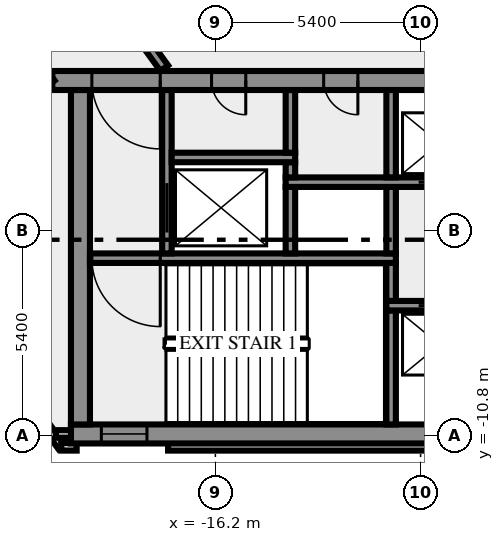
"""IFC4 building model, lengths in metres.
Left out: names, types, materials, properties, quantities, classifications, styles, units other than length and angle.
Written with IfcOpenShell. Run it as: python <this file> out.ifc"""

import sys

from ifc_helpers import new_model, si_unit, direction, frame, frame_2d, origin, place, context, subcontext, project, spatial, rectangle, extrude, element, fill, save


model = new_model("IFC4")
c1 = context("Model", 3, precision=1e-05, world=origin(), true_north=direction((0.0, 1.0)))
c2 = subcontext(c1, "Body", "Model", "MODEL_VIEW")
j1 = project(units=[si_unit("LENGTHUNIT", "METRE"), si_unit("PLANEANGLEUNIT", "RADIAN")], contexts=[c1])
p1 = place(None, origin())
s1 = spatial("IfcSite", under=j1, at=p1, CompositionType="ELEMENT")
p2 = place(p1, origin())
s2 = spatial("IfcBuilding", under=s1, at=p2, CompositionType="ELEMENT")
p3 = place(p2, frame((0.0, 0.0, 75.0)))
s3 = spatial("IfcBuildingStorey", under=s2, at=p3, CompositionType="ELEMENT", Elevation=75.0)
p4 = place(p3, frame((-21.833, -8.909, 0.0), z_axis=(0.0, 0.0, 1.0), x_axis=(0.587766567315, -0.809030569476, 0.0)))
e1 = element("IfcWall", 1, at=p4, inside=s3, PredefinedType="SOLIDWALL", context=c2, shape_type="SweptSolid", body=[
    extrude(rectangle(XDim=2.688, YDim=0.2, at=frame_2d((1.344, 0.0))), origin(), (0.0, 0.0, 1.0), 3.4),
])
p5 = place(p3, frame((-20.256, -11.088, 0.0), z_axis=(0.0, 0.0, 1.0), x_axis=(1.0, 0.0, 0.0)))
e2 = element("IfcWall", 2, at=p5, inside=s3, PredefinedType="SOLIDWALL", context=c2, shape_type="SweptSolid", body=[
    extrude(rectangle(XDim=0.406, YDim=0.2, at=frame_2d((0.203, 0.0))), origin(), (0.0, 0.0, 1.0), 3.4),
])
p6 = place(p3, frame((-17.444, -11.088, 0.0), z_axis=(0.0, 0.0, 1.0), x_axis=(1.0, 0.0, 0.0)))
e3 = element("IfcWall", 3, at=p6, inside=s3, PredefinedType="SOLIDWALL", context=c2, shape_type="SweptSolid", body=[
    extrude(rectangle(XDim=34.888, YDim=0.2, at=frame_2d((17.444, 0.0))), origin(), (0.0, 0.0, 1.0), 3.4),
])
p7 = place(p3, frame((-19.98, -10.75, 0.0), z_axis=(0.0, 0.0, 1.0), x_axis=(-1.0, 0.0, 0.0)))
e4 = element("IfcWall", 4, at=p7, inside=s3, PredefinedType="SOLIDWALL", context=c2, shape_type="SweptSolid", body=[
    extrude(rectangle(XDim=0.417, YDim=0.2, at=frame_2d((0.208, 0.0))), origin(), (0.0, 0.0, 1.0), 3.4),
])
p8 = place(p3, frame((-20.0, -10.75, 0.0), z_axis=(0.0, 0.0, 1.0), x_axis=(1.0, 0.0, 0.0)))
e5 = element("IfcWall", 5, at=p8, inside=s3, PredefinedType="SHEAR", context=c2, shape_type="SweptSolid", body=[
    extrude(rectangle(XDim=40.0, YDim=0.5, at=frame_2d((20.0, 0.0))), origin(), (0.0, 0.0, 1.0), 3.4),
])
p9 = place(p8, frame((0.8, 0.0, 1.0)))
e6 = element("IfcOpeningElement", 6, at=p9, cuts=e5, PredefinedType="OPENING", context=c2, shape_type="SweptSolid", body=[
    extrude(rectangle(XDim=1.2, YDim=1.2, at=frame_2d((0.6, 0.6))), frame((0.0, 0.26, 0.0), z_axis=(0.0, -1.0, 0.0), x_axis=(1.0, 0.0, 0.0)), (0.0, 0.0, 1.0), 0.52),
])
p10 = place(p8, frame((38.0, 0.0, 1.0)))
e7 = element("IfcOpeningElement", 7, at=p10, cuts=e5, PredefinedType="OPENING", context=c2, shape_type="SweptSolid", body=[
    extrude(rectangle(XDim=1.2, YDim=1.2, at=frame_2d((0.6, 0.6))), frame((0.0, 0.26, 0.0), z_axis=(0.0, -1.0, 0.0), x_axis=(1.0, 0.0, 0.0)), (0.0, 0.0, 1.0), 0.52),
])
p11 = place(p3, frame((-19.75, -10.5, 0.0), z_axis=(0.0, 0.0, 1.0), x_axis=(0.0, 1.0, 0.0)))
e8 = element("IfcWall", 8, at=p11, inside=s3, PredefinedType="SHEAR", context=c2, shape_type="SweptSolid", body=[
    extrude(rectangle(XDim=8.8, YDim=0.5, at=frame_2d((4.4, 0.0))), origin(), (0.0, 0.0, 1.0), 3.4),
])
p12 = place(p3, frame((-11.575, -10.5, 0.0), z_axis=(0.0, 0.0, 1.0), x_axis=(0.0, 1.0, 0.0)))
e9 = element("IfcWall", 9, at=p12, inside=s3, PredefinedType="SHEAR", context=c2, shape_type="SweptSolid", body=[
    extrude(rectangle(XDim=3.0, YDim=0.25, at=frame_2d((1.5, 0.0))), origin(), (0.0, 0.0, 1.0), 3.4),
])
p13 = place(p3, frame((11.7, -7.375, 0.0), z_axis=(0.0, 0.0, 1.0), x_axis=(-1.0, 0.0, 0.0)))
e10 = element("IfcWall", 10, at=p13, inside=s3, PredefinedType="SHEAR", context=c2, shape_type="SweptSolid", body=[
    extrude(rectangle(XDim=23.4, YDim=0.25, at=frame_2d((11.7, 0.0))), origin(), (0.0, 0.0, 1.0), 3.4),
])
p14 = place(p13, frame((21.45, 0.0, 0.0)))
e11 = element("IfcOpeningElement", 11, at=p14, cuts=e10, PredefinedType="OPENING", context=c2, shape_type="SweptSolid", body=[
    extrude(rectangle(XDim=1.1, YDim=2.1, at=frame_2d((0.55, 1.05))), frame((0.0, 0.135, 0.0), z_axis=(0.0, -1.0, 0.0), x_axis=(1.0, 0.0, 0.0)), (0.0, 0.0, 1.0), 0.27),
])
p15 = place(p13, frame((18.95, 0.0, 0.0)))
e12 = element("IfcOpeningElement", 12, at=p15, cuts=e10, PredefinedType="OPENING", context=c2, shape_type="SweptSolid", body=[
    extrude(rectangle(XDim=1.1, YDim=2.1, at=frame_2d((0.55, 1.05))), frame((0.0, 0.135, 0.0), z_axis=(0.0, -1.0, 0.0), x_axis=(1.0, 0.0, 0.0)), (0.0, 0.0, 1.0), 0.27),
])
p16 = place(p13, frame((16.45, 0.0, 0.0)))
e13 = element("IfcOpeningElement", 13, at=p16, cuts=e10, PredefinedType="OPENING", context=c2, shape_type="SweptSolid", body=[
    extrude(rectangle(XDim=1.1, YDim=2.1, at=frame_2d((0.55, 1.05))), frame((0.0, 0.135, 0.0), z_axis=(0.0, -1.0, 0.0), x_axis=(1.0, 0.0, 0.0)), (0.0, 0.0, 1.0), 0.27),
])
p17 = place(p13, frame((14.65, 0.0, 0.0)))
e14 = element("IfcOpeningElement", 14, at=p17, cuts=e10, PredefinedType="OPENING", context=c2, shape_type="SweptSolid", body=[
    extrude(rectangle(XDim=0.8, YDim=2.1, at=frame_2d((0.4, 1.05))), frame((0.0, 0.135, 0.0), z_axis=(0.0, -1.0, 0.0), x_axis=(1.0, 0.0, 0.0)), (0.0, 0.0, 1.0), 0.27),
])
p18 = place(p13, frame((12.8, 0.0, 0.0)))
e15 = element("IfcOpeningElement", 15, at=p18, cuts=e10, PredefinedType="OPENING", context=c2, shape_type="SweptSolid", body=[
    extrude(rectangle(XDim=0.9, YDim=2.1, at=frame_2d((0.45, 1.05))), frame((0.0, 0.135, 0.0), z_axis=(0.0, -1.0, 0.0), x_axis=(1.0, 0.0, 0.0)), (0.0, 0.0, 1.0), 0.27),
])
p19 = place(p13, frame((10.7, 0.0, 0.0)))
e16 = element("IfcOpeningElement", 16, at=p19, cuts=e10, PredefinedType="OPENING", context=c2, shape_type="SweptSolid", body=[
    extrude(rectangle(XDim=0.9, YDim=2.1, at=frame_2d((0.45, 1.05))), frame((0.0, 0.135, 0.0), z_axis=(0.0, -1.0, 0.0), x_axis=(1.0, 0.0, 0.0)), (0.0, 0.0, 1.0), 0.27),
])
p20 = place(p3, frame((-11.575, -7.25, 0.0), z_axis=(0.0, 0.0, 1.0), x_axis=(0.0, 1.0, 0.0)))
e17 = element("IfcWall", 17, at=p20, inside=s3, PredefinedType="SHEAR", context=c2, shape_type="SweptSolid", body=[
    extrude(rectangle(XDim=1.0, YDim=0.25, at=frame_2d((0.5, 0.0))), origin(), (0.0, 0.0, 1.0), 3.4),
])
p21 = place(p3, frame((-11.45, -6.125, 0.0), z_axis=(0.0, 0.0, 1.0), x_axis=(-1.0, 0.0, 0.0)))
e18 = element("IfcWall", 18, at=p21, inside=s3, PredefinedType="SHEAR", context=c2, shape_type="SweptSolid", body=[
    extrude(rectangle(XDim=8.05, YDim=0.25, at=frame_2d((4.025, 0.0))), origin(), (0.0, 0.0, 1.0), 3.4),
])
p22 = place(p21, frame((6.2, 0.0, 0.0)))
e19 = element("IfcOpeningElement", 19, at=p22, cuts=e18, PredefinedType="OPENING", context=c2, shape_type="SweptSolid", body=[
    extrude(rectangle(XDim=1.8, YDim=2.1, at=frame_2d((0.9, 1.05))), frame((0.0, 0.135, 0.0), z_axis=(0.0, -1.0, 0.0), x_axis=(1.0, 0.0, 0.0)), (0.0, 0.0, 1.0), 0.27),
])
p23 = place(p3, frame((-17.475, -6.0, 0.0), z_axis=(0.0, 0.0, 1.0), x_axis=(0.0, 1.0, 0.0)))
e20 = element("IfcWall", 20, at=p23, inside=s3, PredefinedType="SHEAR", context=c2, shape_type="SweptSolid", body=[
    extrude(rectangle(XDim=4.3, YDim=0.25, at=frame_2d((2.15, 0.0))), origin(), (0.0, 0.0, 1.0), 3.4),
])
p24 = place(p23, frame((0.55, 0.0, 0.0)))
e21 = element("IfcOpeningElement", 21, at=p24, cuts=e20, PredefinedType="OPENING", context=c2, shape_type="SweptSolid", body=[
    extrude(rectangle(XDim=1.3, YDim=2.1, at=frame_2d((0.65, 1.05))), frame((0.0, 0.135, 0.0), z_axis=(0.0, -1.0, 0.0), x_axis=(1.0, 0.0, 0.0)), (0.0, 0.0, 1.0), 0.27),
])
for number, where, z_axis, x_axis in (
    (22, (-14.225, -6.0, 0.0), (0.0, 0.0, 1.0), (0.0, 1.0, 0.0)),
    (23, (-11.575, -6.0, 0.0), (0.0, 0.0, 1.0), (0.0, 1.0, 0.0)),
):
    element("IfcWall", number, at=place(p3, frame(where, z_axis=z_axis, x_axis=x_axis)), inside=s3, PredefinedType="SHEAR", context=c2, shape_type="SweptSolid", body=[
        extrude(rectangle(XDim=1.75, YDim=0.25, at=frame_2d((0.875, 0.0))), origin(), (0.0, 0.0, 1.0), 3.4),
    ])
p25 = place(p3, frame((-14.35, -4.125, 0.0), z_axis=(0.0, 0.0, 1.0), x_axis=(1.0, 0.0, 0.0)))
e24 = element("IfcWall", 24, at=p25, inside=s3, PredefinedType="SHEAR", context=c2, shape_type="SweptSolid", body=[
    extrude(rectangle(XDim=10.4, YDim=0.25, at=frame_2d((5.2, 0.0))), origin(), (0.0, 0.0, 1.0), 3.4),
])
p26 = place(p25, frame((3.5, 0.0, 0.0)))
e25 = element("IfcOpeningElement", 25, at=p26, cuts=e24, PredefinedType="OPENING", context=c2, shape_type="SweptSolid", body=[
    extrude(rectangle(XDim=1.1, YDim=2.1, at=frame_2d((0.55, 1.05))), frame((0.0, 0.135, 0.0), z_axis=(0.0, -1.0, 0.0), x_axis=(1.0, 0.0, 0.0)), (0.0, 0.0, 1.0), 0.27),
])
p27 = place(p25, frame((6.0, 0.0, 0.0)))
e26 = element("IfcOpeningElement", 26, at=p27, cuts=e24, PredefinedType="OPENING", context=c2, shape_type="SweptSolid", body=[
    extrude(rectangle(XDim=1.1, YDim=2.1, at=frame_2d((0.55, 1.05))), frame((0.0, 0.135, 0.0), z_axis=(0.0, -1.0, 0.0), x_axis=(1.0, 0.0, 0.0)), (0.0, 0.0, 1.0), 0.27),
])
p28 = place(p25, frame((8.5, 0.0, 0.0)))
e27 = element("IfcOpeningElement", 27, at=p28, cuts=e24, PredefinedType="OPENING", context=c2, shape_type="SweptSolid", body=[
    extrude(rectangle(XDim=1.1, YDim=2.1, at=frame_2d((0.55, 1.05))), frame((0.0, 0.135, 0.0), z_axis=(0.0, -1.0, 0.0), x_axis=(1.0, 0.0, 0.0)), (0.0, 0.0, 1.0), 0.27),
])
p29 = place(p3, frame((-14.225, -4.0, 0.0), z_axis=(0.0, 0.0, 1.0), x_axis=(0.0, 1.0, 0.0)))
e28 = element("IfcWall", 28, at=p29, inside=s3, PredefinedType="SHEAR", context=c2, shape_type="SweptSolid", body=[
    extrude(rectangle(XDim=0.4, YDim=0.25, at=frame_2d((0.2, 0.0))), origin(), (0.0, 0.0, 1.0), 3.4),
])
p30 = place(p3, frame((-11.575, -4.0, 0.0), z_axis=(0.0, 0.0, 1.0), x_axis=(0.0, 1.0, 0.0)))
e29 = element("IfcWall", 29, at=p30, inside=s3, PredefinedType="SHEAR", context=c2, shape_type="SweptSolid", body=[
    extrude(rectangle(XDim=2.3, YDim=0.25, at=frame_2d((1.15, 0.0))), origin(), (0.0, 0.0, 1.0), 3.4),
])
p31 = place(p3, frame((-17.35, -3.475, 0.0), z_axis=(0.0, 0.0, 1.0), x_axis=(1.0, 0.0, 0.0)))
e30 = element("IfcWall", 30, at=p31, inside=s3, PredefinedType="SHEAR", context=c2, shape_type="SweptSolid", body=[
    extrude(rectangle(XDim=3.25, YDim=0.25, at=frame_2d((1.625, 0.0))), origin(), (0.0, 0.0, 1.0), 3.4),
])
p32 = place(p3, frame((-14.225, -3.35, 0.0), z_axis=(0.0, 0.0, 1.0), x_axis=(0.0, 1.0, 0.0)))
e31 = element("IfcWall", 31, at=p32, inside=s3, PredefinedType="SHEAR", context=c2, shape_type="SweptSolid", body=[
    extrude(rectangle(XDim=1.65, YDim=0.25, at=frame_2d((0.825, 0.0))), origin(), (0.0, 0.0, 1.0), 3.4),
])
p33 = place(p3, frame((20.49, -1.45, 0.0), z_axis=(0.0, 0.0, 1.0), x_axis=(-1.0, 0.0, 0.0)))
e32 = element("IfcWall", 32, at=p33, inside=s3, PredefinedType="SHEAR", context=c2, shape_type="SweptSolid", body=[
    extrude(rectangle(XDim=40.98, YDim=0.5, at=frame_2d((20.49, 0.0))), origin(), (0.0, 0.0, 1.0), 3.4),
])
p34 = place(p33, frame((38.14, 0.0, 0.0)))
e33 = element("IfcOpeningElement", 33, at=p34, cuts=e32, PredefinedType="OPENING", context=c2, shape_type="SweptSolid", body=[
    extrude(rectangle(XDim=1.8, YDim=2.1, at=frame_2d((0.9, 1.05))), frame((0.0, 0.26, 0.0), z_axis=(0.0, -1.0, 0.0), x_axis=(1.0, 0.0, 0.0)), (0.0, 0.0, 1.0), 0.52),
])
p35 = place(p33, frame((35.89, 0.0, 0.0)))
e34 = element("IfcOpeningElement", 34, at=p35, cuts=e32, PredefinedType="OPENING", context=c2, shape_type="SweptSolid", body=[
    extrude(rectangle(XDim=0.9, YDim=2.1, at=frame_2d((0.45, 1.05))), frame((0.0, 0.26, 0.0), z_axis=(0.0, -1.0, 0.0), x_axis=(1.0, 0.0, 0.0)), (0.0, 0.0, 1.0), 0.52),
])
p36 = place(p33, frame((32.94, 0.0, 0.0)))
e35 = element("IfcOpeningElement", 35, at=p36, cuts=e32, PredefinedType="OPENING", context=c2, shape_type="SweptSolid", body=[
    extrude(rectangle(XDim=0.9, YDim=2.1, at=frame_2d((0.45, 1.05))), frame((0.0, 0.26, 0.0), z_axis=(0.0, -1.0, 0.0), x_axis=(1.0, 0.0, 0.0)), (0.0, 0.0, 1.0), 0.52),
])
p37 = place(p33, frame((21.765, 0.0, 0.0)))
e36 = element("IfcOpeningElement", 36, at=p37, cuts=e32, PredefinedType="OPENING", context=c2, shape_type="SweptSolid", body=[
    extrude(rectangle(XDim=2.0, YDim=2.1, at=frame_2d((1.0, 1.05))), frame((0.0, 0.26, 0.0), z_axis=(0.0, -1.0, 0.0), x_axis=(1.0, 0.0, 0.0)), (0.0, 0.0, 1.0), 0.52),
])
p38 = place(p33, frame((7.14, 0.0, 0.0)))
e37 = element("IfcOpeningElement", 37, at=p38, cuts=e32, PredefinedType="OPENING", context=c2, shape_type="SweptSolid", body=[
    extrude(rectangle(XDim=0.9, YDim=2.1, at=frame_2d((0.45, 1.05))), frame((0.0, 0.26, 0.0), z_axis=(0.0, -1.0, 0.0), x_axis=(1.0, 0.0, 0.0)), (0.0, 0.0, 1.0), 0.52),
])
p39 = place(p33, frame((5.028, 0.0, 0.0)))
e38 = element("IfcOpeningElement", 38, at=p39, cuts=e32, PredefinedType="OPENING", context=c2, shape_type="SweptSolid", body=[
    extrude(rectangle(XDim=0.8, YDim=2.1, at=frame_2d((0.4, 1.05))), frame((0.0, 0.26, 0.0), z_axis=(0.0, -1.0, 0.0), x_axis=(1.0, 0.0, 0.0)), (0.0, 0.0, 1.0), 0.52),
])
p40 = place(p33, frame((3.452, 0.0, 0.0)))
e39 = element("IfcOpeningElement", 39, at=p40, cuts=e32, PredefinedType="OPENING", context=c2, shape_type="SweptSolid", body=[
    extrude(rectangle(XDim=0.8, YDim=2.1, at=frame_2d((0.4, 1.05))), frame((0.0, 0.26, 0.0), z_axis=(0.0, -1.0, 0.0), x_axis=(1.0, 0.0, 0.0)), (0.0, 0.0, 1.0), 0.52),
])
p41 = place(p33, frame((1.04, 0.0, 0.0)))
e40 = element("IfcOpeningElement", 40, at=p41, cuts=e32, PredefinedType="OPENING", context=c2, shape_type="SweptSolid", body=[
    extrude(rectangle(XDim=1.8, YDim=2.1, at=frame_2d((0.9, 1.05))), frame((0.0, 0.26, 0.0), z_axis=(0.0, -1.0, 0.0), x_axis=(1.0, 0.0, 0.0)), (0.0, 0.0, 1.0), 0.52),
])
p42 = place(p3, frame((-20.531, -1.523, 0.0), z_axis=(0.0, 0.0, 1.0), x_axis=(-0.587784593204, 0.809017473231, 0.0)))
e41 = element("IfcWall", 41, at=p42, inside=s3, PredefinedType="SOLIDWALL", context=c2, shape_type="SweptSolid", body=[
    extrude(rectangle(XDim=44.67, YDim=0.25, at=frame_2d((22.335, 0.0))), origin(), (0.0, 0.0, 1.0), 3.4),
])
p43 = place(p42, frame((0.533, 0.0, 0.0)))
e42 = element("IfcOpeningElement", 42, at=p43, cuts=e41, PredefinedType="OPENING", context=c2, shape_type="SweptSolid", body=[
    extrude(rectangle(XDim=0.9, YDim=2.1, at=frame_2d((0.45, 1.05))), frame((0.0, 0.135, 0.0), z_axis=(0.0, -1.0, 0.0), x_axis=(1.0, 0.0, 0.0)), (0.0, 0.0, 1.0), 0.27),
])
p44 = place(p42, frame((32.531, 0.0, 0.0)))
e43 = element("IfcOpeningElement", 43, at=p44, cuts=e41, PredefinedType="OPENING", context=c2, shape_type="SweptSolid", body=[
    extrude(rectangle(XDim=1.8, YDim=2.1, at=frame_2d((0.9, 1.05))), frame((0.0, 0.135, 0.0), z_axis=(0.0, -1.0, 0.0), x_axis=(1.0, 0.0, 0.0)), (0.0, 0.0, 1.0), 0.27),
])
p45 = place(p42, frame((14.566, 0.0, 0.0)))
e44 = element("IfcOpeningElement", 44, at=p45, cuts=e41, PredefinedType="OPENING", context=c2, shape_type="SweptSolid", body=[
    extrude(rectangle(XDim=0.9, YDim=2.1, at=frame_2d((0.45, 1.05))), frame((0.0, 0.135, 0.0), z_axis=(0.0, -1.0, 0.0), x_axis=(1.0, 0.0, 0.0)), (0.0, 0.0, 1.0), 0.27),
])
p46 = place(p3, frame((-37.232, 25.972, 0.0), z_axis=(0.0, 0.0, 1.0), x_axis=(0.587786323093, -0.809016216391, 0.0)))
e45 = element("IfcWall", 45, at=p46, inside=s3, PredefinedType="SOLIDWALL", context=c2, shape_type="SweptSolid", body=[
    extrude(rectangle(XDim=33.493, YDim=0.25, at=frame_2d((16.747, 0.0))), origin(), (0.0, 0.0, 1.0), 3.4),
])
p47 = place(p46, frame((16.435, 0.0, 0.0)))
e46 = element("IfcOpeningElement", 46, at=p47, cuts=e45, PredefinedType="OPENING", context=c2, shape_type="SweptSolid", body=[
    extrude(rectangle(XDim=0.9, YDim=2.1, at=frame_2d((0.45, 1.05))), frame((0.0, 0.135, 0.0), z_axis=(0.0, -1.0, 0.0), x_axis=(1.0, 0.0, 0.0)), (0.0, 0.0, 1.0), 0.27),
])
p48 = place(p46, frame((7.137, 0.0, 0.0)))
e47 = element("IfcOpeningElement", 47, at=p48, cuts=e45, PredefinedType="OPENING", context=c2, shape_type="SweptSolid", body=[
    extrude(rectangle(XDim=1.8, YDim=2.1, at=frame_2d((0.9, 1.05))), frame((0.0, 0.135, 0.0), z_axis=(0.0, -1.0, 0.0), x_axis=(1.0, 0.0, 0.0)), (0.0, 0.0, 1.0), 0.27),
])
p49 = place(p9, origin())
e48 = element("IfcWindow", 48, at=p49, inside=s3, PartitioningType="SINGLE_PANEL", PredefinedType="WINDOW", context=c2, shape_type="SweptSolid", body=[
    extrude(rectangle(XDim=1.2, YDim=1.2, at=frame_2d((0.6, 0.6))), frame((0.0, 0.03, 0.0), z_axis=(0.0, -1.0, 0.0), x_axis=(1.0, 0.0, 0.0)), (0.0, 0.0, 1.0), 0.06),
])
fill(e6, e48)
p50 = place(p14, origin())
e49 = element("IfcDoor", 49, at=p50, inside=s3, OperationType="DOUBLE_DOOR_SLIDING", PredefinedType="DOOR", context=c2, shape_type="SweptSolid", body=[
    extrude(rectangle(XDim=1.1, YDim=2.1, at=frame_2d((0.55, 1.05))), frame((0.0, 0.025, 0.0), z_axis=(0.0, -1.0, 0.0), x_axis=(1.0, 0.0, 0.0)), (0.0, 0.0, 1.0), 0.05),
])
fill(e11, e49)
p51 = place(p22, origin())
e50 = element("IfcDoor", 50, at=p51, inside=s3, OperationType="DOUBLE_DOOR_SINGLE_SWING", PredefinedType="DOOR", context=c2, shape_type="SweptSolid", body=[
    extrude(rectangle(XDim=1.8, YDim=2.1, at=frame_2d((0.9, 1.05))), frame((0.0, 0.025, 0.0), z_axis=(0.0, -1.0, 0.0), x_axis=(1.0, 0.0, 0.0)), (0.0, 0.0, 1.0), 0.05),
])
fill(e19, e50)
p52 = place(p24, origin())
e51 = element("IfcDoor", 51, at=p52, inside=s3, OperationType="DOUBLE_DOOR_SLIDING", PredefinedType="DOOR", context=c2, shape_type="SweptSolid", body=[
    extrude(rectangle(XDim=1.3, YDim=2.1, at=frame_2d((0.65, 1.05))), frame((0.0, 0.025, 0.0), z_axis=(0.0, -1.0, 0.0), x_axis=(1.0, 0.0, 0.0)), (0.0, 0.0, 1.0), 0.05),
])
fill(e21, e51)
p53 = place(p26, origin())
e52 = element("IfcDoor", 52, at=p53, inside=s3, OperationType="DOUBLE_DOOR_SLIDING", PredefinedType="DOOR", context=c2, shape_type="SweptSolid", body=[
    extrude(rectangle(XDim=1.1, YDim=2.1, at=frame_2d((0.55, 1.05))), frame((0.0, 0.025, 0.0), z_axis=(0.0, -1.0, 0.0), x_axis=(1.0, 0.0, 0.0)), (0.0, 0.0, 1.0), 0.05),
])
fill(e25, e52)
p54 = place(p34, origin())
e53 = element("IfcDoor", 53, at=p54, inside=s3, OperationType="DOUBLE_DOOR_SINGLE_SWING", PredefinedType="DOOR", context=c2, shape_type="SweptSolid", body=[
    extrude(rectangle(XDim=1.8, YDim=2.1, at=frame_2d((0.9, 1.05))), frame((0.0, 0.025, 0.0), z_axis=(0.0, -1.0, 0.0), x_axis=(1.0, 0.0, 0.0)), (0.0, 0.0, 1.0), 0.05),
])
fill(e33, e53)
p55 = place(p35, origin())
e54 = element("IfcDoor", 54, at=p55, inside=s3, OperationType="SINGLE_SWING_RIGHT", PredefinedType="DOOR", context=c2, shape_type="SweptSolid", body=[
    extrude(rectangle(XDim=0.9, YDim=2.1, at=frame_2d((0.45, 1.05))), frame((0.0, 0.025, 0.0), z_axis=(0.0, -1.0, 0.0), x_axis=(1.0, 0.0, 0.0)), (0.0, 0.0, 1.0), 0.05),
])
fill(e34, e54)
p56 = place(p36, origin())
e55 = element("IfcDoor", 55, at=p56, inside=s3, OperationType="SINGLE_SWING_RIGHT", PredefinedType="DOOR", context=c2, shape_type="SweptSolid", body=[
    extrude(rectangle(XDim=0.9, YDim=2.1, at=frame_2d((0.45, 1.05))), frame((0.0, 0.025, 0.0), z_axis=(0.0, -1.0, 0.0), x_axis=(1.0, 0.0, 0.0)), (0.0, 0.0, 1.0), 0.05),
])
fill(e35, e55)
save(model, sys.argv[1])
